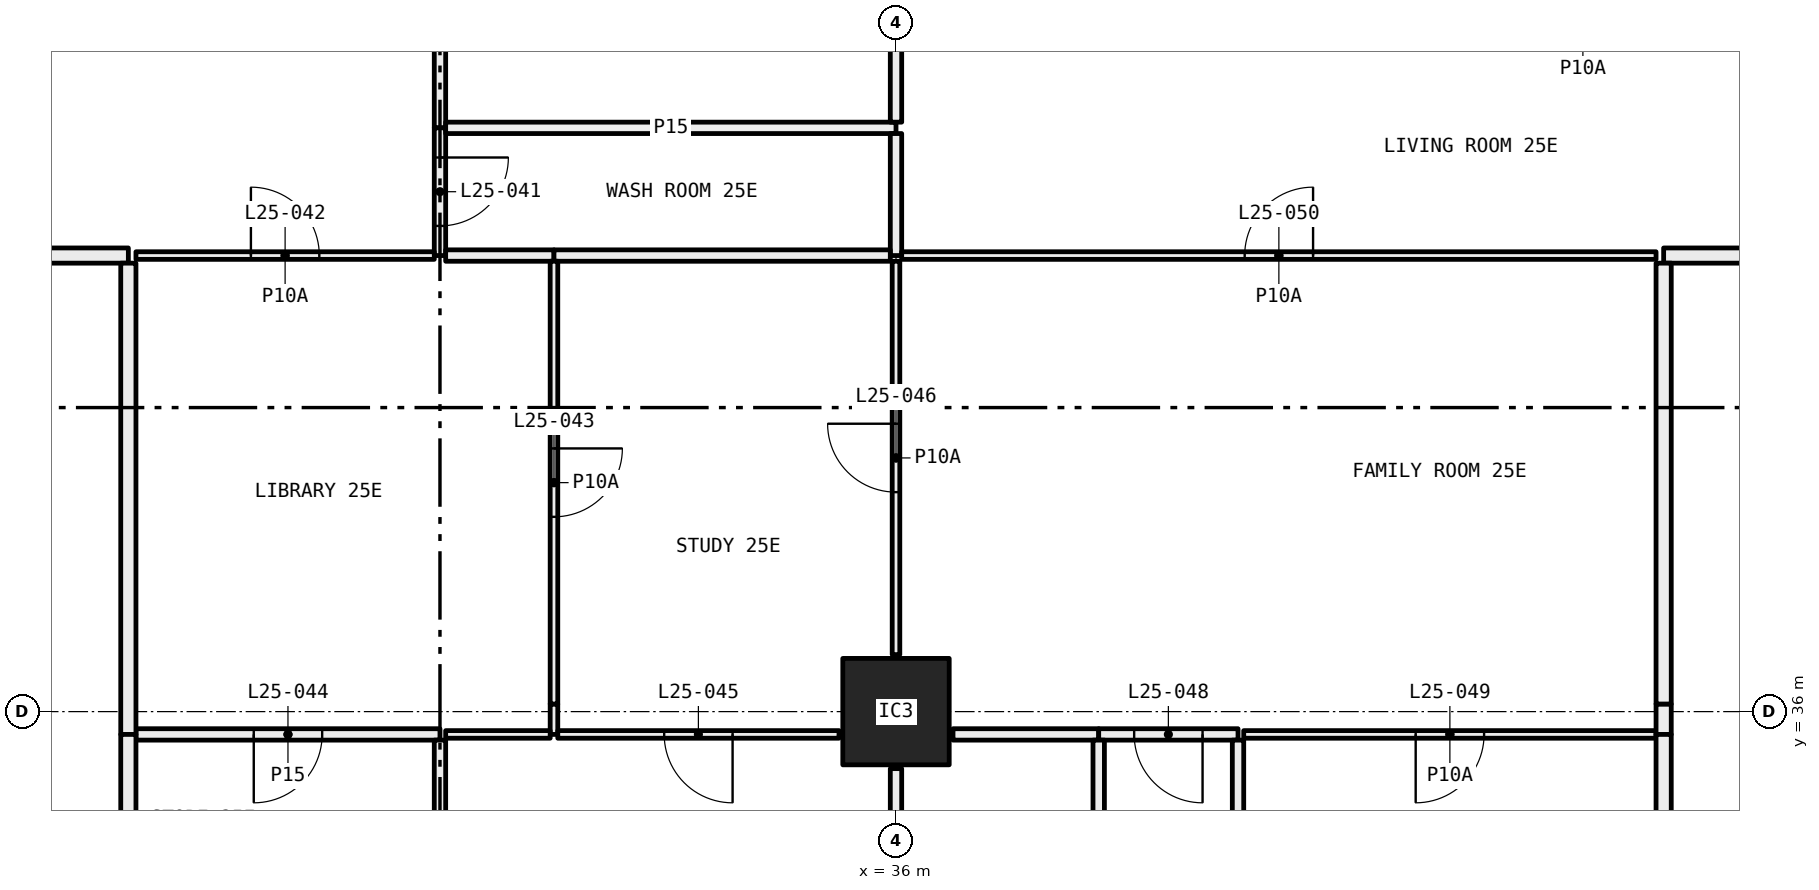
"""IFC4 building model, lengths in metres.
Left out: names, types, materials, properties, quantities, classifications, styles, units other than length and angle.
Written with IfcOpenShell. Run it as: python <this file> out.ifc"""

import sys

from ifc_helpers import new_model, si_unit, direction, frame, frame_2d, origin, origin_2d, place, context, subcontext, project, spatial, rectangle, hollow_rectangle, extrude, element, fill, save


model = new_model("IFC4")
c1 = context("Model", 3, precision=1e-05, world=origin(), true_north=direction((0.0, 1.0)))
c2 = subcontext(c1, "Body", "Model", "MODEL_VIEW")
j1 = project(units=[si_unit("LENGTHUNIT", "METRE"), si_unit("PLANEANGLEUNIT", "RADIAN")], contexts=[c1])
p1 = place(None, origin())
s1 = spatial("IfcSite", under=j1, at=p1, CompositionType="ELEMENT")
p2 = place(p1, origin())
s2 = spatial("IfcBuilding", under=s1, at=p2, CompositionType="ELEMENT")
p3 = place(p2, frame((0.0, 0.0, 100.05)))
s3 = spatial("IfcBuildingStorey", under=s2, at=p3, CompositionType="ELEMENT", Elevation=100.05)
p4 = place(p3, frame((36.0, 36.0, 0.0), z_axis=(0.0, 0.0, 1.0), x_axis=(1.0, 0.0, 0.0)))
e1 = element("IfcColumn", 1, at=p4, inside=s3, PredefinedType="COLUMN", context=c2, shape_type="SweptSolid", body=[
    extrude(hollow_rectangle(XDim=1.4, YDim=1.4, WallThickness=0.06, at=origin_2d()), origin(), (0.0, 0.0, 1.0), 3.05),
])
p5 = place(p3, frame((30.0, 43.68, 0.0), z_axis=(0.0, 0.0, 1.0), x_axis=(0.0, 1.0, 0.0)))
e2 = element("IfcWall", 2, at=p5, inside=s3, PredefinedType="PARTITIONING", context=c2, shape_type="SweptSolid", body=[
    extrude(rectangle(XDim=3.6, YDim=0.15, at=frame_2d((1.8, 0.0))), origin(), (0.0, 0.0, 1.0), 3.05),
])
p6 = place(p5, frame((1.35, 0.0, 0.0)))
e3 = element("IfcOpeningElement", 3, at=p6, cuts=e2, PredefinedType="OPENING", context=c2, shape_type="SweptSolid", body=[
    extrude(rectangle(XDim=0.9, YDim=2.1, at=frame_2d((0.45, 1.05))), frame((0.0, 0.085, 0.0), z_axis=(0.0, -1.0, 0.0), x_axis=(1.0, 0.0, 0.0)), (0.0, 0.0, 1.0), 0.17),
])
p7 = place(p3, frame((30.0, 42.0, 0.0), z_axis=(0.0, 0.0, 1.0), x_axis=(0.0, 1.0, 0.0)))
e4 = element("IfcWall", 4, at=p7, inside=s3, PredefinedType="PARTITIONING", context=c2, shape_type="SweptSolid", body=[
    extrude(rectangle(XDim=1.68, YDim=0.15, at=frame_2d((0.84, 0.0))), origin(), (0.0, 0.0, 1.0), 3.05),
])
p8 = place(p7, frame((0.39, 0.0, 0.0)))
e5 = element("IfcOpeningElement", 5, at=p8, cuts=e4, PredefinedType="OPENING", context=c2, shape_type="SweptSolid", body=[
    extrude(rectangle(XDim=0.9, YDim=2.1, at=frame_2d((0.45, 1.05))), frame((0.0, 0.085, 0.0), z_axis=(0.0, -1.0, 0.0), x_axis=(1.0, 0.0, 0.0)), (0.0, 0.0, 1.0), 0.17),
])
p9 = place(p3, frame((26.0, 42.0, 0.0), z_axis=(0.0, 0.0, 1.0), x_axis=(1.0, 0.0, 0.0)))
e6 = element("IfcWall", 6, at=p9, inside=s3, PredefinedType="PARTITIONING", context=c2, shape_type="SweptSolid", body=[
    extrude(rectangle(XDim=3.925, YDim=0.1, at=frame_2d((1.962, 0.0))), origin(), (0.0, 0.0, 1.0), 3.05),
])
p10 = place(p9, frame((1.512, 0.0, 0.0)))
e7 = element("IfcOpeningElement", 7, at=p10, cuts=e6, PredefinedType="OPENING", context=c2, shape_type="SweptSolid", body=[
    extrude(rectangle(XDim=0.9, YDim=2.1, at=frame_2d((0.45, 1.05))), frame((0.0, 0.06, 0.0), z_axis=(0.0, -1.0, 0.0), x_axis=(1.0, 0.0, 0.0)), (0.0, 0.0, 1.0), 0.12),
])
p11 = place(p3, frame((24.0, 42.0, 0.0), z_axis=(0.0, 0.0, 1.0), x_axis=(1.0, 0.0, 0.0)))
e8 = element("IfcWall", 8, at=p11, inside=s3, PredefinedType="PARTITIONING", context=c2, shape_type="SweptSolid", body=[
    extrude(rectangle(XDim=1.9, YDim=0.2, at=frame_2d((0.95, 0.0))), origin(), (0.0, 0.0, 1.0), 3.05),
])
p12 = place(p3, frame((30.075, 43.68, 0.0), z_axis=(0.0, 0.0, 1.0), x_axis=(1.0, 0.0, 0.0)))
e9 = element("IfcWall", 9, at=p12, inside=s3, PredefinedType="PARTITIONING", context=c2, shape_type="SweptSolid", body=[
    extrude(rectangle(XDim=5.925, YDim=0.15, at=frame_2d((2.962, 0.0))), origin(), (0.0, 0.0, 1.0), 2.45),
])
p13 = place(p3, frame((36.0, 43.755, 0.0), z_axis=(0.0, 0.0, 1.0), x_axis=(0.0, 1.0, 0.0)))
e10 = element("IfcWall", 10, at=p13, inside=s3, PredefinedType="PARTITIONING", context=c2, shape_type="SweptSolid", body=[
    extrude(rectangle(XDim=1.245, YDim=0.15, at=frame_2d((0.623, 0.0))), origin(), (0.0, 0.0, 1.0), 2.45),
])
p14 = place(p3, frame((36.0, 42.0, 0.0), z_axis=(0.0, 0.0, 1.0), x_axis=(0.0, 1.0, 0.0)))
e11 = element("IfcWall", 11, at=p14, inside=s3, PredefinedType="PARTITIONING", context=c2, shape_type="SweptSolid", body=[
    extrude(rectangle(XDim=1.605, YDim=0.15, at=frame_2d((0.802, 0.0))), origin(), (0.0, 0.0, 1.0), 2.45),
])
p15 = place(p3, frame((30.075, 42.0, 0.0), z_axis=(0.0, 0.0, 1.0), x_axis=(1.0, 0.0, 0.0)))
e12 = element("IfcWall", 12, at=p15, inside=s3, PredefinedType="PARTITIONING", context=c2, shape_type="SweptSolid", body=[
    extrude(rectangle(XDim=1.425, YDim=0.15, at=frame_2d((0.712, 0.0))), origin(), (0.0, 0.0, 1.0), 3.05),
])
p16 = place(p3, frame((31.5, 42.0, 0.0), z_axis=(0.0, 0.0, 1.0), x_axis=(1.0, 0.0, 0.0)))
e13 = element("IfcWall", 13, at=p16, inside=s3, PredefinedType="PARTITIONING", context=c2, shape_type="SweptSolid", body=[
    extrude(rectangle(XDim=4.425, YDim=0.15, at=frame_2d((2.212, 0.0))), origin(), (0.0, 0.0, 1.0), 2.45),
])
p17 = place(p3, frame((36.075, 42.0, 0.0), z_axis=(0.0, 0.0, 1.0), x_axis=(1.0, 0.0, 0.0)))
e14 = element("IfcWall", 14, at=p17, inside=s3, PredefinedType="PARTITIONING", context=c2, shape_type="SweptSolid", body=[
    extrude(rectangle(XDim=9.925, YDim=0.1, at=frame_2d((4.962, 0.0))), origin(), (0.0, 0.0, 1.0), 2.45),
])
p18 = place(p17, frame((4.512, 0.0, 0.0)))
e15 = element("IfcOpeningElement", 15, at=p18, cuts=e14, PredefinedType="OPENING", context=c2, shape_type="SweptSolid", body=[
    extrude(rectangle(XDim=0.9, YDim=2.1, at=frame_2d((0.45, 1.05))), frame((0.0, 0.06, 0.0), z_axis=(0.0, -1.0, 0.0), x_axis=(1.0, 0.0, 0.0)), (0.0, 0.0, 1.0), 0.12),
])
p19 = place(p3, frame((46.1, 42.0, 0.0), z_axis=(0.0, 0.0, 1.0), x_axis=(1.0, 0.0, 0.0)))
e16 = element("IfcWall", 16, at=p19, inside=s3, PredefinedType="PARTITIONING", context=c2, shape_type="SweptSolid", body=[
    extrude(rectangle(XDim=7.9, YDim=0.2, at=frame_2d((3.95, 0.0))), origin(), (0.0, 0.0, 1.0), 3.05),
])
p20 = place(p3, frame((31.5, 35.7, 0.0), z_axis=(0.0, 0.0, 1.0), x_axis=(0.0, 1.0, 0.0)))
e17 = element("IfcWall", 17, at=p20, inside=s3, PredefinedType="PARTITIONING", context=c2, shape_type="SweptSolid", body=[
    extrude(rectangle(XDim=0.4, YDim=0.1, at=frame_2d((0.2, 0.0))), origin(), (0.0, 0.0, 1.0), 2.45),
])
p21 = place(p3, frame((31.5, 36.1, 0.0), z_axis=(0.0, 0.0, 1.0), x_axis=(0.0, 1.0, 0.0)))
e18 = element("IfcWall", 18, at=p21, inside=s3, PredefinedType="PARTITIONING", context=c2, shape_type="SweptSolid", body=[
    extrude(rectangle(XDim=5.825, YDim=0.1, at=frame_2d((2.913, 0.0))), origin(), (0.0, 0.0, 1.0), 3.05),
])
p22 = place(p21, frame((2.462, 0.0, 0.0)))
e19 = element("IfcOpeningElement", 19, at=p22, cuts=e18, PredefinedType="OPENING", context=c2, shape_type="SweptSolid", body=[
    extrude(rectangle(XDim=0.9, YDim=2.1, at=frame_2d((0.45, 1.05))), frame((0.0, 0.06, 0.0), z_axis=(0.0, -1.0, 0.0), x_axis=(1.0, 0.0, 0.0)), (0.0, 0.0, 1.0), 0.12),
])
p23 = place(p3, frame((26.0, 35.7, 0.0), z_axis=(0.0, 0.0, 1.0), x_axis=(1.0, 0.0, 0.0)))
e20 = element("IfcWall", 20, at=p23, inside=s3, PredefinedType="PARTITIONING", context=c2, shape_type="SweptSolid", body=[
    extrude(rectangle(XDim=4.0, YDim=0.15, at=frame_2d((2.0, 0.0))), origin(), (0.0, 0.0, 1.0), 3.05),
])
p24 = place(p23, frame((1.55, 0.0, 0.0)))
e21 = element("IfcOpeningElement", 21, at=p24, cuts=e20, PredefinedType="OPENING", context=c2, shape_type="SweptSolid", body=[
    extrude(rectangle(XDim=0.9, YDim=2.1, at=frame_2d((0.45, 1.05))), frame((0.0, 0.085, 0.0), z_axis=(0.0, -1.0, 0.0), x_axis=(1.0, 0.0, 0.0)), (0.0, 0.0, 1.0), 0.17),
])
p25 = place(p3, frame((30.075, 35.7, 0.0), z_axis=(0.0, 0.0, 1.0), x_axis=(1.0, 0.0, 0.0)))
e22 = element("IfcWall", 22, at=p25, inside=s3, PredefinedType="PARTITIONING", context=c2, shape_type="SweptSolid", body=[
    extrude(rectangle(XDim=1.375, YDim=0.1, at=frame_2d((0.688, 0.0))), origin(), (0.0, 0.0, 1.0), 3.05),
])
p26 = place(p3, frame((25.9, 41.9, 0.0), z_axis=(0.0, 0.0, 1.0), x_axis=(0.0, -1.0, 0.0)))
e23 = element("IfcWall", 23, at=p26, inside=s3, PredefinedType="PARTITIONING", context=c2, shape_type="SweptSolid", body=[
    extrude(rectangle(XDim=6.2, YDim=0.2, at=frame_2d((3.1, 0.0))), origin(), (0.0, 0.0, 1.0), 2.45),
])
p27 = place(p3, frame((31.55, 35.7, 0.0), z_axis=(0.0, 0.0, 1.0), x_axis=(1.0, 0.0, 0.0)))
e24 = element("IfcWall", 24, at=p27, inside=s3, PredefinedType="PARTITIONING", context=c2, shape_type="SweptSolid", body=[
    extrude(rectangle(XDim=3.7, YDim=0.1, at=frame_2d((1.85, 0.0))), origin(), (0.0, 0.0, 1.0), 3.05),
])
p28 = place(p27, frame((1.4, 0.0, 0.0)))
e25 = element("IfcOpeningElement", 25, at=p28, cuts=e24, PredefinedType="OPENING", context=c2, shape_type="SweptSolid", body=[
    extrude(rectangle(XDim=0.9, YDim=2.1, at=frame_2d((0.45, 1.05))), frame((0.0, 0.06, 0.0), z_axis=(0.0, -1.0, 0.0), x_axis=(1.0, 0.0, 0.0)), (0.0, 0.0, 1.0), 0.12),
])
p29 = place(p3, frame((36.0, 36.75, 0.0), z_axis=(0.0, 0.0, 1.0), x_axis=(0.0, 1.0, 0.0)))
e26 = element("IfcWall", 26, at=p29, inside=s3, PredefinedType="PARTITIONING", context=c2, shape_type="SweptSolid", body=[
    extrude(rectangle(XDim=5.175, YDim=0.1, at=frame_2d((2.587, 0.0))), origin(), (0.0, 0.0, 1.0), 2.45),
])
p30 = place(p29, frame((2.137, 0.0, 0.0)))
e27 = element("IfcOpeningElement", 27, at=p30, cuts=e26, PredefinedType="OPENING", context=c2, shape_type="SweptSolid", body=[
    extrude(rectangle(XDim=0.9, YDim=2.1, at=frame_2d((0.45, 1.05))), frame((0.0, 0.06, 0.0), z_axis=(0.0, -1.0, 0.0), x_axis=(1.0, 0.0, 0.0)), (0.0, 0.0, 1.0), 0.12),
])
p31 = place(p3, frame((30.0, 33.675, 0.0), z_axis=(0.0, 0.0, 1.0), x_axis=(0.0, 1.0, 0.0)))
e28 = element("IfcWall", 28, at=p31, inside=s3, PredefinedType="PARTITIONING", context=c2, shape_type="SweptSolid", body=[
    extrude(rectangle(XDim=1.95, YDim=0.15, at=frame_2d((0.975, 0.0))), origin(), (0.0, 0.0, 1.0), 3.05),
])
p32 = place(p3, frame((25.9, 35.7, 0.0), z_axis=(0.0, 0.0, 1.0), x_axis=(0.0, -1.0, 0.0)))
e29 = element("IfcWall", 29, at=p32, inside=s3, PredefinedType="PARTITIONING", context=c2, shape_type="SweptSolid", body=[
    extrude(rectangle(XDim=2.1, YDim=0.2, at=frame_2d((1.05, 0.0))), origin(), (0.0, 0.0, 1.0), 3.05),
])
p33 = place(p3, frame((36.0, 31.3, 0.0), z_axis=(0.0, 0.0, 1.0), x_axis=(0.0, 1.0, 0.0)))
e30 = element("IfcWall", 30, at=p33, inside=s3, PredefinedType="PARTITIONING", context=c2, shape_type="SweptSolid", body=[
    extrude(rectangle(XDim=3.95, YDim=0.15, at=frame_2d((1.975, 0.0))), origin(), (0.0, 0.0, 1.0), 2.45),
])
p34 = place(p33, frame((1.525, 0.0, 0.0)))
e31 = element("IfcOpeningElement", 31, at=p34, cuts=e30, PredefinedType="OPENING", context=c2, shape_type="SweptSolid", body=[
    extrude(rectangle(XDim=0.9, YDim=2.1, at=frame_2d((0.45, 1.05))), frame((0.0, 0.085, 0.0), z_axis=(0.0, -1.0, 0.0), x_axis=(1.0, 0.0, 0.0)), (0.0, 0.0, 1.0), 0.17),
])
p35 = place(p3, frame((36.75, 35.7, 0.0), z_axis=(0.0, 0.0, 1.0), x_axis=(1.0, 0.0, 0.0)))
e32 = element("IfcWall", 32, at=p35, inside=s3, PredefinedType="PARTITIONING", context=c2, shape_type="SweptSolid", body=[
    extrude(rectangle(XDim=1.917, YDim=0.15, at=frame_2d((0.958, 0.0))), origin(), (0.0, 0.0, 1.0), 3.05),
])
p36 = place(p3, frame((38.667, 35.7, 0.0), z_axis=(0.0, 0.0, 1.0), x_axis=(1.0, 0.0, 0.0)))
e33 = element("IfcWall", 33, at=p36, inside=s3, PredefinedType="PARTITIONING", context=c2, shape_type="SweptSolid", body=[
    extrude(rectangle(XDim=1.833, YDim=0.15, at=frame_2d((0.917, 0.0))), origin(), (0.0, 0.0, 1.0), 3.05),
])
p37 = place(p36, frame((0.467, 0.0, 0.0)))
e34 = element("IfcOpeningElement", 34, at=p37, cuts=e33, PredefinedType="OPENING", context=c2, shape_type="SweptSolid", body=[
    extrude(rectangle(XDim=0.9, YDim=2.1, at=frame_2d((0.45, 1.05))), frame((0.0, 0.085, 0.0), z_axis=(0.0, -1.0, 0.0), x_axis=(1.0, 0.0, 0.0)), (0.0, 0.0, 1.0), 0.17),
])
p38 = place(p3, frame((40.575, 35.7, 0.0), z_axis=(0.0, 0.0, 1.0), x_axis=(1.0, 0.0, 0.0)))
e35 = element("IfcWall", 35, at=p38, inside=s3, PredefinedType="PARTITIONING", context=c2, shape_type="SweptSolid", body=[
    extrude(rectangle(XDim=5.425, YDim=0.1, at=frame_2d((2.712, 0.0))), origin(), (0.0, 0.0, 1.0), 3.05),
])
p39 = place(p38, frame((2.262, 0.0, 0.0)))
e36 = element("IfcOpeningElement", 36, at=p39, cuts=e35, PredefinedType="OPENING", context=c2, shape_type="SweptSolid", body=[
    extrude(rectangle(XDim=0.9, YDim=2.1, at=frame_2d((0.45, 1.05))), frame((0.0, 0.06, 0.0), z_axis=(0.0, -1.0, 0.0), x_axis=(1.0, 0.0, 0.0)), (0.0, 0.0, 1.0), 0.12),
])
p40 = place(p3, frame((46.1, 35.7, 0.0), z_axis=(0.0, 0.0, 1.0), x_axis=(0.0, 1.0, 0.0)))
e37 = element("IfcWall", 37, at=p40, inside=s3, PredefinedType="PARTITIONING", context=c2, shape_type="SweptSolid", body=[
    extrude(rectangle(XDim=0.4, YDim=0.2, at=frame_2d((0.2, 0.0))), origin(), (0.0, 0.0, 1.0), 2.45),
])
p41 = place(p3, frame((46.1, 36.1, 0.0), z_axis=(0.0, 0.0, 1.0), x_axis=(0.0, 1.0, 0.0)))
e38 = element("IfcWall", 38, at=p41, inside=s3, PredefinedType="PARTITIONING", context=c2, shape_type="SweptSolid", body=[
    extrude(rectangle(XDim=5.8, YDim=0.2, at=frame_2d((2.9, 0.0))), origin(), (0.0, 0.0, 1.0), 3.05),
])
for number, where, z_axis, x_axis in (
    (39, (38.667, 31.3, 0.0), (0.0, 0.0, 1.0), (0.0, 1.0, 0.0)),
    (40, (40.5, 31.3, 0.0), (0.0, 0.0, 1.0), (0.0, 1.0, 0.0)),
):
    element("IfcWall", number, at=place(p3, frame(where, z_axis=z_axis, x_axis=x_axis)), inside=s3, PredefinedType="PARTITIONING", context=c2, shape_type="SweptSolid", body=[
        extrude(rectangle(XDim=4.325, YDim=0.15, at=frame_2d((2.163, 0.0))), origin(), (0.0, 0.0, 1.0), 3.05),
    ])
p42 = place(p3, frame((46.1, 31.3, 0.0), z_axis=(0.0, 0.0, 1.0), x_axis=(0.0, 1.0, 0.0)))
e41 = element("IfcWall", 41, at=p42, inside=s3, PredefinedType="PARTITIONING", context=c2, shape_type="SweptSolid", body=[
    extrude(rectangle(XDim=4.4, YDim=0.2, at=frame_2d((2.2, 0.0))), origin(), (0.0, 0.0, 1.0), 3.05),
])
p43 = place(p8, frame((0.9, 0.0, 0.0), x_axis=(-1.0, 0.0, 0.0)))
e42 = element("IfcDoor", 42, at=p43, inside=s3, OperationType="SINGLE_SWING_RIGHT", PredefinedType="DOOR", context=c2, shape_type="SweptSolid", body=[
    extrude(rectangle(XDim=0.9, YDim=2.1, at=frame_2d((0.45, 1.05))), frame((0.0, 0.025, 0.0), z_axis=(0.0, -1.0, 0.0), x_axis=(1.0, 0.0, 0.0)), (0.0, 0.0, 1.0), 0.05),
])
fill(e5, e42)
p44 = place(p10, origin())
e43 = element("IfcDoor", 43, at=p44, inside=s3, OperationType="SINGLE_SWING_RIGHT", PredefinedType="DOOR", context=c2, shape_type="SweptSolid", body=[
    extrude(rectangle(XDim=0.9, YDim=2.1, at=frame_2d((0.45, 1.05))), frame((0.0, 0.025, 0.0), z_axis=(0.0, -1.0, 0.0), x_axis=(1.0, 0.0, 0.0)), (0.0, 0.0, 1.0), 0.05),
])
fill(e7, e43)
p45 = place(p22, frame((0.9, 0.0, 0.0), x_axis=(-1.0, 0.0, 0.0)))
e44 = element("IfcDoor", 44, at=p45, inside=s3, OperationType="SINGLE_SWING_RIGHT", PredefinedType="DOOR", context=c2, shape_type="SweptSolid", body=[
    extrude(rectangle(XDim=0.9, YDim=2.1, at=frame_2d((0.45, 1.05))), frame((0.0, 0.025, 0.0), z_axis=(0.0, -1.0, 0.0), x_axis=(1.0, 0.0, 0.0)), (0.0, 0.0, 1.0), 0.05),
])
fill(e19, e44)
p46 = place(p24, frame((0.9, 0.0, 0.0), x_axis=(-1.0, 0.0, 0.0)))
e45 = element("IfcDoor", 45, at=p46, inside=s3, OperationType="SINGLE_SWING_LEFT", PredefinedType="DOOR", context=c2, shape_type="SweptSolid", body=[
    extrude(rectangle(XDim=0.9, YDim=2.1, at=frame_2d((0.45, 1.05))), frame((0.0, 0.025, 0.0), z_axis=(0.0, -1.0, 0.0), x_axis=(1.0, 0.0, 0.0)), (0.0, 0.0, 1.0), 0.05),
])
fill(e21, e45)
p47 = place(p28, frame((0.9, 0.0, 0.0), x_axis=(-1.0, 0.0, 0.0)))
e46 = element("IfcDoor", 46, at=p47, inside=s3, OperationType="SINGLE_SWING_RIGHT", PredefinedType="DOOR", context=c2, shape_type="SweptSolid", body=[
    extrude(rectangle(XDim=0.9, YDim=2.1, at=frame_2d((0.45, 1.05))), frame((0.0, 0.025, 0.0), z_axis=(0.0, -1.0, 0.0), x_axis=(1.0, 0.0, 0.0)), (0.0, 0.0, 1.0), 0.05),
])
fill(e25, e46)
p48 = place(p30, origin())
e47 = element("IfcDoor", 47, at=p48, inside=s3, OperationType="SINGLE_SWING_LEFT", PredefinedType="DOOR", context=c2, shape_type="SweptSolid", body=[
    extrude(rectangle(XDim=0.9, YDim=2.1, at=frame_2d((0.45, 1.05))), frame((0.0, 0.025, 0.0), z_axis=(0.0, -1.0, 0.0), x_axis=(1.0, 0.0, 0.0)), (0.0, 0.0, 1.0), 0.05),
])
fill(e27, e47)
p49 = place(p37, frame((0.9, 0.0, 0.0), x_axis=(-1.0, 0.0, 0.0)))
e48 = element("IfcDoor", 48, at=p49, inside=s3, OperationType="SINGLE_SWING_RIGHT", PredefinedType="DOOR", context=c2, shape_type="SweptSolid", body=[
    extrude(rectangle(XDim=0.9, YDim=2.1, at=frame_2d((0.45, 1.05))), frame((0.0, 0.025, 0.0), z_axis=(0.0, -1.0, 0.0), x_axis=(1.0, 0.0, 0.0)), (0.0, 0.0, 1.0), 0.05),
])
fill(e34, e48)
p50 = place(p39, frame((0.9, 0.0, 0.0), x_axis=(-1.0, 0.0, 0.0)))
e49 = element("IfcDoor", 49, at=p50, inside=s3, OperationType="SINGLE_SWING_LEFT", PredefinedType="DOOR", context=c2, shape_type="SweptSolid", body=[
    extrude(rectangle(XDim=0.9, YDim=2.1, at=frame_2d((0.45, 1.05))), frame((0.0, 0.025, 0.0), z_axis=(0.0, -1.0, 0.0), x_axis=(1.0, 0.0, 0.0)), (0.0, 0.0, 1.0), 0.05),
])
fill(e36, e49)
p51 = place(p18, origin())
e50 = element("IfcDoor", 50, at=p51, inside=s3, OperationType="SINGLE_SWING_LEFT", PredefinedType="DOOR", context=c2, shape_type="SweptSolid", body=[
    extrude(rectangle(XDim=0.9, YDim=2.1, at=frame_2d((0.45, 1.05))), frame((0.0, 0.025, 0.0), z_axis=(0.0, -1.0, 0.0), x_axis=(1.0, 0.0, 0.0)), (0.0, 0.0, 1.0), 0.05),
])
fill(e15, e50)
save(model, sys.argv[1])
